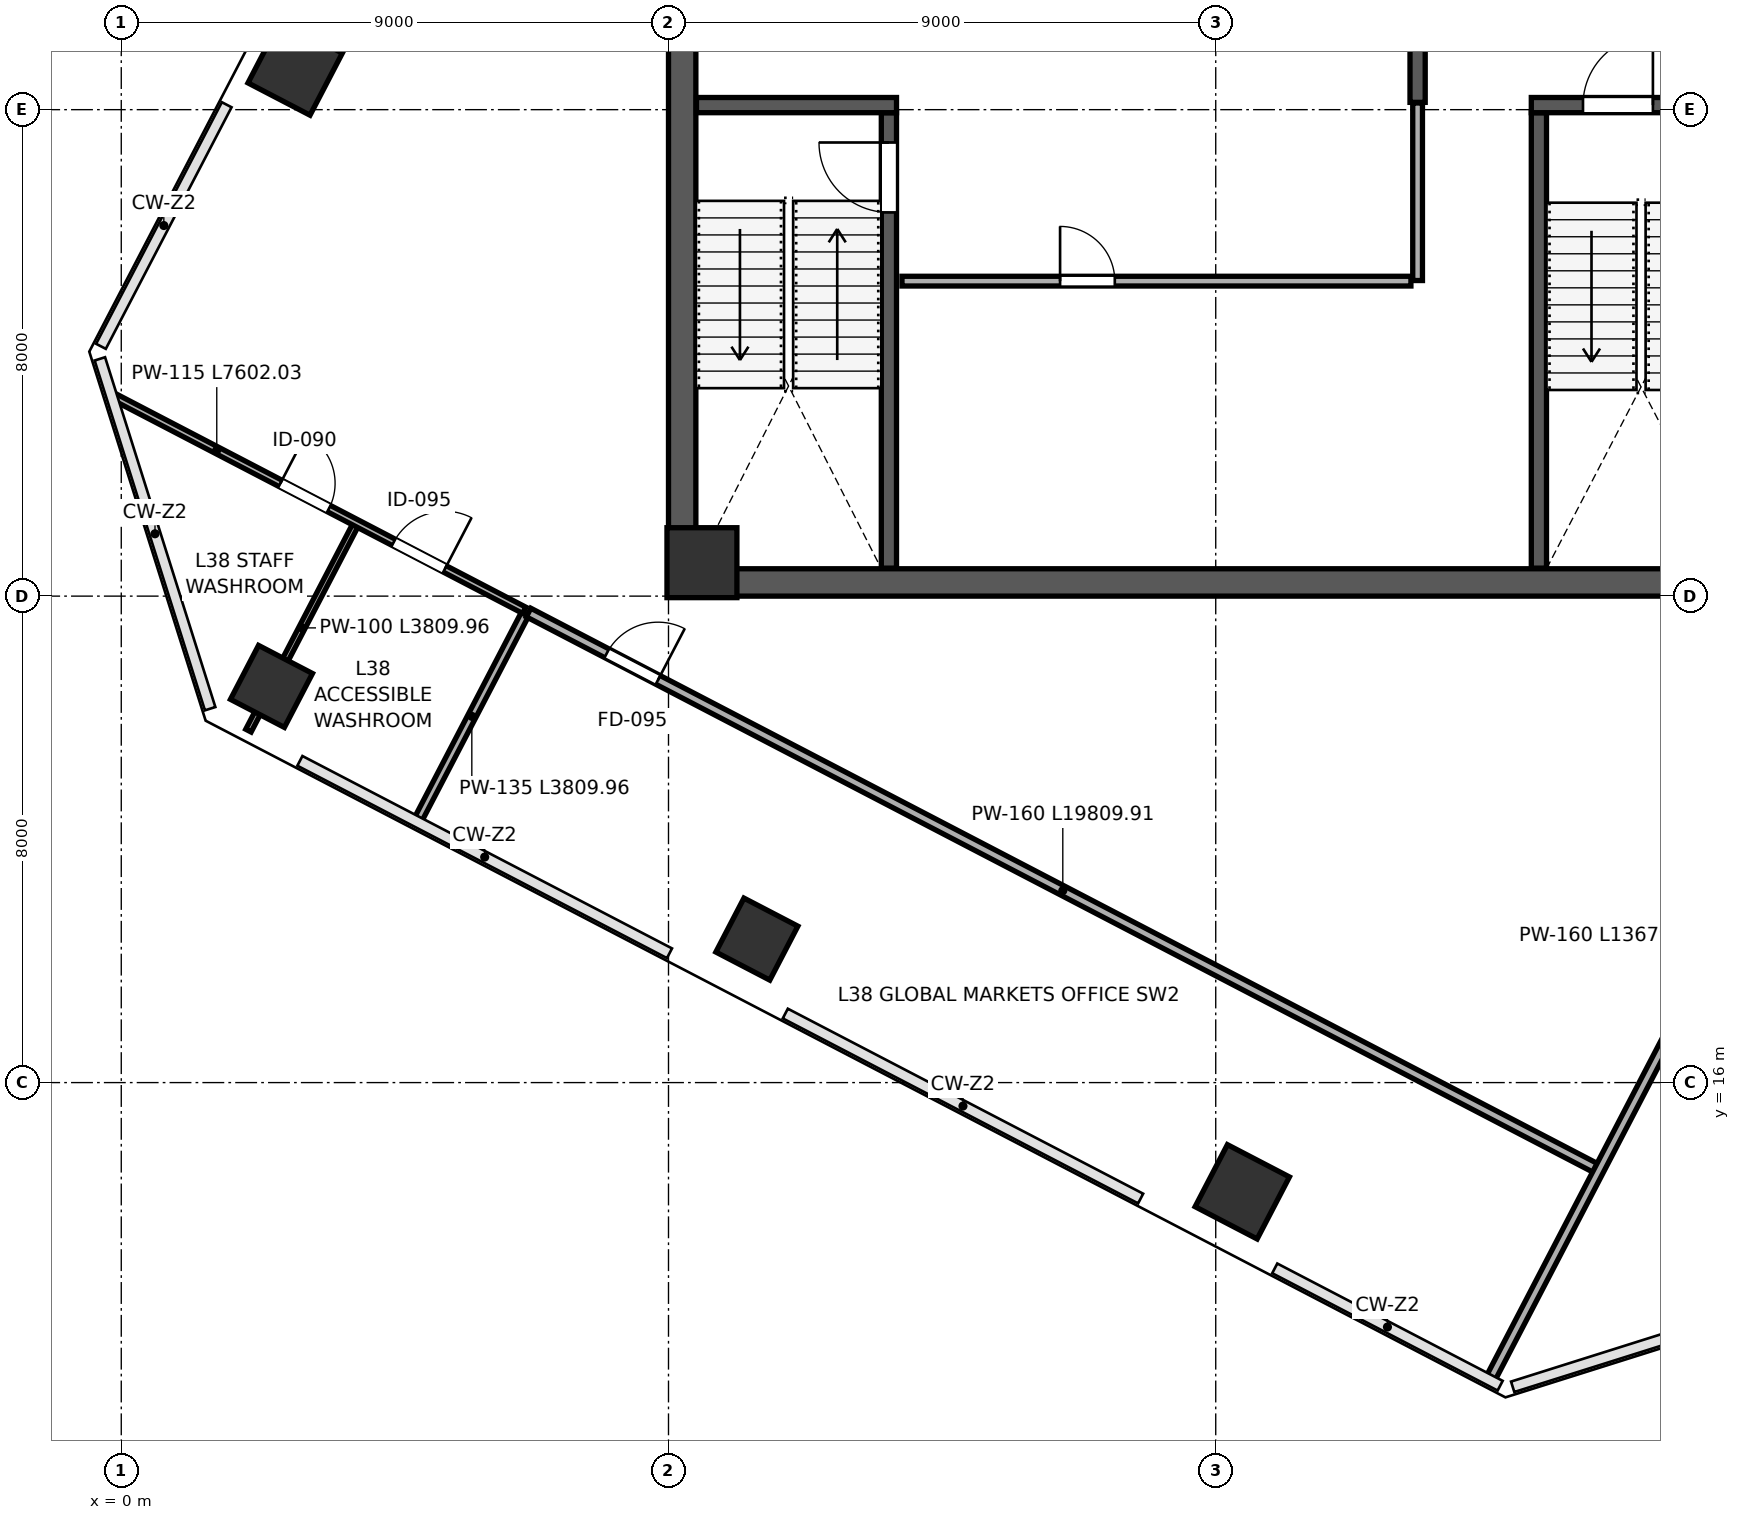
"""IFC4 building model, lengths in metres.
Left out: names, types, materials, properties, quantities, classifications, styles, units other than length and angle.
Written with IfcOpenShell. Run it as: python <this file> out.ifc"""

import sys

from ifc_helpers import new_model, si_unit, direction, frame, frame_2d, origin, origin_2d, place, context, subcontext, project, spatial, rectangle, extrude, clip, halfspace, source, transform, mapped, element, fill, save


model = new_model("IFC4")
c1 = context("Model", 3, precision=1e-05, world=origin(), true_north=direction((0.0, 1.0)))
c2 = subcontext(c1, "Body", "Model", "MODEL_VIEW")
j1 = project(units=[si_unit("LENGTHUNIT", "METRE"), si_unit("PLANEANGLEUNIT", "RADIAN")], contexts=[c1])
p1 = place(None, origin())
s1 = spatial("IfcSite", under=j1, at=p1, CompositionType="ELEMENT")
p2 = place(p1, origin())
s2 = spatial("IfcBuilding", under=s1, at=p2, CompositionType="ELEMENT")
p3 = place(p2, frame((0.0, 0.0, 170.8)))
s3 = spatial("IfcBuildingStorey", under=s2, at=p3, CompositionType="ELEMENT", Elevation=170.8)
m1 = source(origin(), c2, "Body", "SweptSolid", [
    extrude(rectangle(XDim=1.15, YDim=1.15, at=origin_2d()), origin(), (0.0, 0.0, 1.0), 4.198),
])
p4 = place(p3, frame((9.55, 24.55, 0.001), z_axis=(0.0, 0.0, 1.0), x_axis=(1.0, 0.0, 0.0)))
e1 = element("IfcColumn", 1, at=p4, inside=s3, PredefinedType="COLUMN", context=c2, shape_type="MappedRepresentation", body=[
    mapped(m1, transform((0.0, 0.0, 0.0), scale=1.0)),
])
p5 = place(p3, frame((2.47, 22.515, 0.0), z_axis=(-0.04789818408, 0.098743059821, 0.993959542486), x_axis=(0.998381539794, -0.025812536987, 0.050675575318)))
e2 = element("IfcColumn", 2, at=p5, inside=s3, PredefinedType="COLUMN", context=c2, shape_type="Clipping", body=[
    clip(clip(extrude(rectangle(XDim=1.0, YDim=1.0, at=origin_2d()), origin(), (0.0, 0.0, 1.0), 4.226), halfspace(frame((0.0, 0.0, 0.075), z_axis=(0.0, 0.0, -1.0), x_axis=(1.0, 0.0, 0.0)), False)), halfspace(frame((0.0, 0.0, 4.15), z_axis=(0.0, 0.0, 1.0), x_axis=(1.0, 0.0, 0.0)), False)),
])
p6 = place(p3, frame((10.453, 18.36, 0.0), z_axis=(-0.069930353767, 0.057889365701, 0.995870758161), x_axis=(0.919841956587, 0.390043080031, 0.041918619051)))
e3 = element("IfcColumn", 3, at=p6, inside=s3, PredefinedType="COLUMN", context=c2, shape_type="Clipping", body=[
    clip(clip(extrude(rectangle(XDim=1.0, YDim=1.0, at=origin_2d()), origin(), (0.0, 0.0, 1.0), 4.217), halfspace(frame((0.0, 0.0, 0.062), z_axis=(0.0, 0.0, -1.0), x_axis=(1.0, 0.0, 0.0)), False)), halfspace(frame((0.0, 0.0, 4.155), z_axis=(0.0, 0.0, 1.0), x_axis=(1.0, 0.0, 0.0)), False)),
])
p7 = place(p3, frame((18.437, 14.204, 0.0), z_axis=(-0.091848266599, 0.016841742647, 0.995630579898), x_axis=(0.612171305094, 0.789548693959, 0.043117897532)))
e4 = element("IfcColumn", 4, at=p7, inside=s3, PredefinedType="COLUMN", context=c2, shape_type="Clipping", body=[
    clip(clip(extrude(rectangle(XDim=1.15, YDim=1.15, at=origin_2d()), origin(), (0.0, 0.0, 1.0), 4.218), halfspace(frame((0.0, 0.0, 0.073), z_axis=(0.0, 0.0, -1.0), x_axis=(1.0, 0.0, 0.0)), False)), halfspace(frame((0.0, 0.0, 4.145), z_axis=(0.0, 0.0, 1.0), x_axis=(1.0, 0.0, 0.0)), False)),
])
p8 = place(p3, frame((2.86, 32.684, 0.0), z_axis=(0.004570815836, 0.096334283132, 0.995338542173), x_axis=(0.864231908447, -0.501118834093, 0.044532264024)))
e5 = element("IfcColumn", 5, at=p8, inside=s3, PredefinedType="COLUMN", context=c2, shape_type="Clipping", body=[
    clip(clip(extrude(rectangle(XDim=1.15, YDim=1.15, at=origin_2d()), origin(), (0.0, 0.0, 1.0), 4.22), halfspace(frame((0.0, 0.0, 0.076), z_axis=(0.0, 0.0, -1.0), x_axis=(1.0, 0.0, 0.0)), False)), halfspace(frame((0.0, 0.0, 4.144), z_axis=(0.0, 0.0, 1.0), x_axis=(1.0, 0.0, 0.0)), False)),
])
p9 = place(p3, frame((9.225, 24.45, 0.0), z_axis=(0.0, 0.0, 1.0), x_axis=(0.0, 1.0, 0.0)))
e6 = element("IfcWall", 6, at=p9, inside=s3, PredefinedType="SHEAR", context=c2, shape_type="SweptSolid", body=[
    extrude(rectangle(XDim=15.1, YDim=0.45, at=frame_2d((7.55, 0.0))), origin(), (0.0, 0.0, 1.0), 3.96),
])
p10 = place(p3, frame((9.0, 24.225, 0.0), z_axis=(0.0, 0.0, 1.0), x_axis=(1.0, 0.0, 0.0)))
e7 = element("IfcWall", 7, at=p10, inside=s3, PredefinedType="SHEAR", context=c2, shape_type="SweptSolid", body=[
    extrude(rectangle(XDim=18.0, YDim=0.45, at=frame_2d((9.0, 0.0))), origin(), (0.0, 0.0, 1.0), 3.96),
])
p11 = place(p3, frame((12.625, 24.46, 0.0), z_axis=(0.0, 0.0, 1.0), x_axis=(0.0, 1.0, 0.0)))
e8 = element("IfcWall", 8, at=p11, inside=s3, PredefinedType="SHEAR", context=c2, shape_type="SweptSolid", body=[
    extrude(rectangle(XDim=7.49, YDim=0.25, at=frame_2d((3.745, 0.0))), origin(), (0.0, 0.0, 1.0), 3.96),
])
p12 = place(p11, frame((5.85, 0.0, 0.0)))
e9 = element("IfcOpeningElement", 9, at=p12, cuts=e8, PredefinedType="OPENING", context=c2, shape_type="SweptSolid", body=[
    extrude(rectangle(XDim=1.15, YDim=2.2, at=frame_2d((0.575, 1.1))), frame((0.0, 0.135, 0.0), z_axis=(0.0, -1.0, 0.0), x_axis=(1.0, 0.0, 0.0)), (0.0, 0.0, 1.0), 0.27),
])
p13 = place(p3, frame((9.46, 32.075, 0.0), z_axis=(0.0, 0.0, 1.0), x_axis=(1.0, 0.0, 0.0)))
e10 = element("IfcWall", 10, at=p13, inside=s3, PredefinedType="SHEAR", context=c2, shape_type="SweptSolid", body=[
    extrude(rectangle(XDim=3.29, YDim=0.25, at=frame_2d((1.645, 0.0))), origin(), (0.0, 0.0, 1.0), 3.96),
])
p14 = place(p3, frame((23.315, 24.46, 0.0), z_axis=(0.0, 0.0, 1.0), x_axis=(0.0, 1.0, 0.0)))
e11 = element("IfcWall", 11, at=p14, inside=s3, PredefinedType="SHEAR", context=c2, shape_type="SweptSolid", body=[
    extrude(rectangle(XDim=7.49, YDim=0.25, at=frame_2d((3.745, 0.0))), origin(), (0.0, 0.0, 1.0), 3.96),
])
p15 = place(p3, frame((23.19, 32.075, 0.0), z_axis=(0.0, 0.0, 1.0), x_axis=(1.0, 0.0, 0.0)))
e12 = element("IfcWall", 12, at=p15, inside=s3, PredefinedType="SHEAR", context=c2, shape_type="SweptSolid", body=[
    extrude(rectangle(XDim=3.35, YDim=0.25, at=frame_2d((1.675, 0.0))), origin(), (0.0, 0.0, 1.0), 3.96),
])
p16 = place(p15, frame((0.85, 0.0, 0.0)))
e13 = element("IfcOpeningElement", 13, at=p16, cuts=e12, PredefinedType="OPENING", context=c2, shape_type="SweptSolid", body=[
    extrude(rectangle(XDim=1.15, YDim=2.2, at=frame_2d((0.575, 1.1))), frame((0.0, 0.135, 0.0), z_axis=(0.0, -1.0, 0.0), x_axis=(1.0, 0.0, 0.0)), (0.0, 0.0, 1.0), 0.27),
])
p17 = place(p3, frame((21.32, 32.12, 0.0), z_axis=(0.0, 0.0, 1.0), x_axis=(0.0, 1.0, 0.0)))
e14 = element("IfcWall", 14, at=p17, inside=s3, PredefinedType="SHEAR", context=c2, shape_type="SweptSolid", body=[
    extrude(rectangle(XDim=7.42, YDim=0.25, at=frame_2d((3.71, 0.0))), origin(), (0.0, 0.0, 1.0), 3.96),
])
p18 = place(p17, frame((1.4, 0.0, 0.0)))
e15 = element("IfcOpeningElement", 15, at=p18, cuts=e14, PredefinedType="OPENING", context=c2, shape_type="SweptSolid", body=[
    extrude(rectangle(XDim=1.15, YDim=2.2, at=frame_2d((0.575, 1.1))), frame((0.0, 0.135, 0.0), z_axis=(0.0, -1.0, 0.0), x_axis=(1.0, 0.0, 0.0)), (0.0, 0.0, 1.0), 0.27),
])
p19 = place(p3, frame((12.84, 29.18, 0.0), z_axis=(0.0, 0.0, 1.0), x_axis=(1.0, 0.0, 0.0)))
e16 = element("IfcWall", 16, at=p19, inside=s3, PredefinedType="PARTITIONING", context=c2, shape_type="SweptSolid", body=[
    extrude(rectangle(XDim=8.37, YDim=0.16, at=frame_2d((4.185, 0.0))), origin(), (0.0, 0.0, 1.0), 3.96),
])
p20 = place(p19, frame((2.6, 0.0, 0.0)))
e17 = element("IfcOpeningElement", 17, at=p20, cuts=e16, PredefinedType="OPENING", context=c2, shape_type="SweptSolid", body=[
    extrude(rectangle(XDim=0.9, YDim=2.15, at=frame_2d((0.45, 1.075))), frame((0.0, 0.09, 0.0), z_axis=(0.0, -1.0, 0.0), x_axis=(1.0, 0.0, 0.0)), (0.0, 0.0, 1.0), 0.18),
])
p21 = place(p3, frame((21.32, 29.19, 0.0), z_axis=(0.0, 0.0, 1.0), x_axis=(0.0, 1.0, 0.0)))
e18 = element("IfcWall", 18, at=p21, inside=s3, PredefinedType="PARTITIONING", context=c2, shape_type="SweptSolid", body=[
    extrude(rectangle(XDim=2.92, YDim=0.16, at=frame_2d((1.46, 0.0))), origin(), (0.0, 0.0, 1.0), 3.96),
])
p22 = place(p3, frame((2.092, 21.788, 0.0), z_axis=(0.0, 0.0, 1.0), x_axis=(0.461687624356, 0.887042579314, 0.0)))
e19 = element("IfcWall", 19, at=p22, inside=s3, PredefinedType="PARTITIONING", context=c2, shape_type="SweptSolid", body=[
    extrude(rectangle(XDim=3.81, YDim=0.1, at=frame_2d((1.905, 0.0))), origin(), (0.0, 0.0, 1.0), 3.195),
])
p23 = place(p3, frame((4.886, 20.333, 0.0), z_axis=(0.0, 0.0, 1.0), x_axis=(0.461764287366, 0.887002673566, 0.0)))
e20 = element("IfcWall", 20, at=p23, inside=s3, PredefinedType="PARTITIONING", context=c2, shape_type="SweptSolid", body=[
    extrude(rectangle(XDim=3.81, YDim=0.135, at=frame_2d((1.905, 0.0))), origin(), (0.0, 0.0, 1.0), 3.195),
])
p24 = place(p3, frame((-0.115, 27.277, 0.0), z_axis=(0.0, 0.0, 1.0), x_axis=(0.887004800346, -0.461760202012, 0.0)))
e21 = element("IfcWall", 21, at=p24, inside=s3, PredefinedType="PARTITIONING", context=c2, shape_type="SweptSolid", body=[
    extrude(rectangle(XDim=7.602, YDim=0.115, at=frame_2d((3.801, 0.0))), origin(), (0.0, 0.0, 1.0), 3.96),
])
p25 = place(p24, frame((3.08, 0.0, 0.0)))
e22 = element("IfcOpeningElement", 22, at=p25, cuts=e21, PredefinedType="OPENING", context=c2, shape_type="SweptSolid", body=[
    extrude(rectangle(XDim=0.9, YDim=2.15, at=frame_2d((0.45, 1.075))), frame((0.0, 0.067, 0.0), z_axis=(0.0, -1.0, 0.0), x_axis=(1.0, 0.0, 0.0)), (0.0, 0.0, 1.0), 0.135),
])
p26 = place(p24, frame((5.18, 0.0, 0.0)))
e23 = element("IfcOpeningElement", 23, at=p26, cuts=e21, PredefinedType="OPENING", context=c2, shape_type="SweptSolid", body=[
    extrude(rectangle(XDim=0.95, YDim=2.15, at=frame_2d((0.475, 1.075))), frame((0.0, 0.067, 0.0), z_axis=(0.0, -1.0, 0.0), x_axis=(1.0, 0.0, 0.0)), (0.0, 0.0, 1.0), 0.135),
])
p27 = place(p3, frame((6.699, 23.73, 0.0), z_axis=(0.0, 0.0, 1.0), x_axis=(0.887009683963, -0.46175082085, 0.0)))
e24 = element("IfcWall", 24, at=p27, inside=s3, PredefinedType="PARTITIONING", context=c2, shape_type="SweptSolid", body=[
    extrude(rectangle(XDim=19.81, YDim=0.16, at=frame_2d((9.905, 0.0))), origin(), (0.0, 0.0, 1.0), 3.96),
])
p28 = place(p27, frame((1.45, 0.0, 0.0)))
e25 = element("IfcOpeningElement", 25, at=p28, cuts=e24, PredefinedType="OPENING", context=c2, shape_type="SweptSolid", body=[
    extrude(rectangle(XDim=0.95, YDim=2.15, at=frame_2d((0.475, 1.075))), frame((0.0, 0.09, 0.0), z_axis=(0.0, -1.0, 0.0), x_axis=(1.0, 0.0, 0.0)), (0.0, 0.0, 1.0), 0.18),
])
p29 = place(p3, frame((22.528, 11.149, 0.0), z_axis=(0.0, 0.0, 1.0), x_axis=(0.461766825398, 0.887001352289, 0.0)))
e26 = element("IfcWall", 26, at=p29, inside=s3, PredefinedType="PARTITIONING", context=c2, shape_type="SweptSolid", body=[
    extrude(rectangle(XDim=13.68, YDim=0.16, at=frame_2d((6.84, 0.0))), origin(), (0.0, 0.0, 1.0), 3.96),
])
m2 = source(origin(), c2, "Body", "SweptSolid", [
    extrude(rectangle(XDim=1.15, YDim=2.2, at=frame_2d((0.575, 1.1))), frame((0.0, 0.025, 0.0), z_axis=(0.0, -1.0, 0.0), x_axis=(1.0, 0.0, 0.0)), (0.0, 0.0, 1.0), 0.05),
])
p30 = place(p12, origin())
e27 = element("IfcDoor", 27, at=p30, inside=s3, OperationType="SINGLE_SWING_RIGHT", PredefinedType="DOOR", context=c2, shape_type="MappedRepresentation", body=[
    mapped(m2, transform((0.0, 0.0, 0.0), scale=1.0)),
])
fill(e9, e27)
p31 = place(p16, origin())
e28 = element("IfcDoor", 28, at=p31, inside=s3, OperationType="SINGLE_SWING_RIGHT", PredefinedType="DOOR", context=c2, shape_type="MappedRepresentation", body=[
    mapped(m2, transform((0.0, 0.0, 0.0), scale=1.0)),
])
fill(e13, e28)
m3 = source(origin(), c2, "Body", "SweptSolid", [
    extrude(rectangle(XDim=0.9, YDim=2.15, at=frame_2d((0.45, 1.075))), frame((0.0, 0.025, 0.0), z_axis=(0.0, -1.0, 0.0), x_axis=(1.0, 0.0, 0.0)), (0.0, 0.0, 1.0), 0.05),
])
p32 = place(p20, origin())
e29 = element("IfcDoor", 29, at=p32, inside=s3, OperationType="SINGLE_SWING_LEFT", PredefinedType="DOOR", context=c2, shape_type="MappedRepresentation", body=[
    mapped(m3, transform((0.0, 0.0, 0.0), scale=1.0)),
])
fill(e17, e29)
m4 = source(origin(), c2, "Body", "SweptSolid", [
    extrude(rectangle(XDim=0.9, YDim=2.15, at=frame_2d((0.45, 1.075))), frame((0.0, 0.025, 0.0), z_axis=(0.0, -1.0, 0.0), x_axis=(1.0, 0.0, 0.0)), (0.0, 0.0, 1.0), 0.05),
])
p33 = place(p25, origin())
e30 = element("IfcDoor", 30, at=p33, inside=s3, OperationType="SINGLE_SWING_LEFT", PredefinedType="DOOR", context=c2, shape_type="MappedRepresentation", body=[
    mapped(m4, transform((0.0, 0.0, 0.0), scale=1.0)),
])
fill(e22, e30)
m5 = source(origin(), c2, "Body", "SweptSolid", [
    extrude(rectangle(XDim=0.95, YDim=2.15, at=frame_2d((0.475, 1.075))), frame((0.0, 0.025, 0.0), z_axis=(0.0, -1.0, 0.0), x_axis=(1.0, 0.0, 0.0)), (0.0, 0.0, 1.0), 0.05),
])
p34 = place(p26, origin())
e31 = element("IfcDoor", 31, at=p34, inside=s3, OperationType="SINGLE_SWING_RIGHT", PredefinedType="DOOR", context=c2, shape_type="MappedRepresentation", body=[
    mapped(m5, transform((0.0, 0.0, 0.0), scale=1.0)),
])
fill(e23, e31)
m6 = source(origin(), c2, "Body", "SweptSolid", [
    extrude(rectangle(XDim=0.95, YDim=2.15, at=frame_2d((0.475, 1.075))), frame((0.0, 0.025, 0.0), z_axis=(0.0, -1.0, 0.0), x_axis=(1.0, 0.0, 0.0)), (0.0, 0.0, 1.0), 0.05),
])
p35 = place(p28, origin())
e32 = element("IfcDoor", 32, at=p35, inside=s3, OperationType="SINGLE_SWING_RIGHT", PredefinedType="DOOR", context=c2, shape_type="MappedRepresentation", body=[
    mapped(m6, transform((0.0, 0.0, 0.0), scale=1.0)),
])
fill(e25, e32)
save(model, sys.argv[1])
